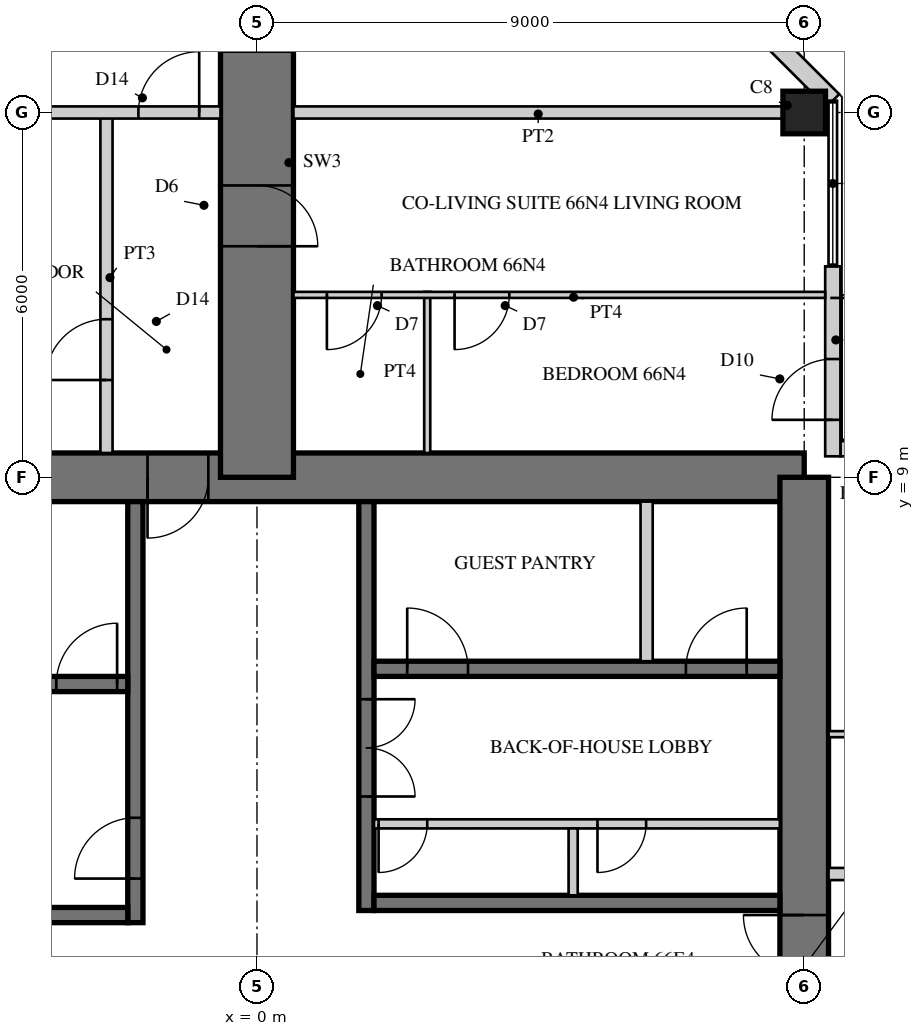
"""IFC4 building model, lengths in metres.
Left out: names, types, materials, properties, quantities, classifications, styles, units other than length and angle.
Written with IfcOpenShell. Run it as: python <this file> out.ifc"""

import sys

from ifc_helpers import new_model, si_unit, direction, frame, frame_2d, origin, origin_2d, place, context, subcontext, project, spatial, rectangle, hollow_rectangle, extrude, element, fill, save


model = new_model("IFC4")
c1 = context("Model", 3, precision=1e-05, world=origin(), true_north=direction((0.0, 1.0)))
c2 = subcontext(c1, "Body", "Model", "MODEL_VIEW")
j1 = project(units=[si_unit("LENGTHUNIT", "METRE"), si_unit("PLANEANGLEUNIT", "RADIAN")], contexts=[c1])
p1 = place(None, origin())
s1 = spatial("IfcSite", under=j1, at=p1, CompositionType="ELEMENT")
p2 = place(p1, origin())
s2 = spatial("IfcBuilding", under=s1, at=p2, CompositionType="ELEMENT")
p3 = place(p2, frame((0.0, 0.0, 257.7)))
s3 = spatial("IfcBuildingStorey", under=s2, at=p3, CompositionType="ELEMENT", Elevation=257.7)
p4 = place(p3, frame((9.0, 9.0, 0.0), z_axis=(0.0, 0.0, 1.0), x_axis=(-1.0, 0.0, 0.0)))
e1 = element("IfcWall", 1, at=p4, inside=s3, PredefinedType="SHEAR", context=c2, shape_type="SweptSolid", body=[
    extrude(rectangle(XDim=18.0, YDim=0.8, at=frame_2d((9.0, 0.0))), origin(), (0.0, 0.0, 1.0), 3.4),
])
p5 = place(p4, frame((9.8, 0.0, 0.0)))
e2 = element("IfcOpeningElement", 2, at=p5, cuts=e1, PredefinedType="OPENING", context=c2, shape_type="SweptSolid", body=[
    extrude(rectangle(XDim=1.0, YDim=2.4, at=frame_2d((0.5, 1.2))), frame((0.0, 0.41, 0.0), z_axis=(0.0, -1.0, 0.0), x_axis=(1.0, 0.0, 0.0)), (0.0, 0.0, 1.0), 0.82),
])
p6 = place(p3, frame((9.0, -9.0, 0.0), z_axis=(0.0, 0.0, 1.0), x_axis=(0.0, 1.0, 0.0)))
e3 = element("IfcWall", 3, at=p6, inside=s3, PredefinedType="SHEAR", context=c2, shape_type="SweptSolid", body=[
    extrude(rectangle(XDim=18.0, YDim=0.8, at=frame_2d((9.0, 0.0))), origin(), (0.0, 0.0, 1.0), 3.4),
])
p7 = place(p6, frame((9.8, 0.0, 0.0)))
e4 = element("IfcOpeningElement", 4, at=p7, cuts=e3, PredefinedType="OPENING", context=c2, shape_type="SweptSolid", body=[
    extrude(rectangle(XDim=1.0, YDim=2.4, at=frame_2d((0.5, 1.2))), frame((0.0, 0.41, 0.0), z_axis=(0.0, -1.0, 0.0), x_axis=(1.0, 0.0, 0.0)), (0.0, 0.0, 1.0), 0.82),
])
p8 = place(p3, frame((1.8, 1.875, 0.0), z_axis=(0.0, 0.0, 1.0), x_axis=(0.0, 1.0, 0.0)))
e5 = element("IfcWall", 5, at=p8, inside=s3, PredefinedType="SHEAR", context=c2, shape_type="SweptSolid", body=[
    extrude(rectangle(XDim=6.725, YDim=0.25, at=frame_2d((3.363, 0.0))), origin(), (0.0, 0.0, 1.0), 3.4),
])
p9 = place(p8, frame((1.875, 0.0, 0.0)))
e6 = element("IfcOpeningElement", 6, at=p9, cuts=e5, PredefinedType="OPENING", context=c2, shape_type="SweptSolid", body=[
    extrude(rectangle(XDim=1.6, YDim=2.4, at=frame_2d((0.8, 1.2))), frame((0.0, 0.135, 0.0), z_axis=(0.0, -1.0, 0.0), x_axis=(1.0, 0.0, 0.0)), (0.0, 0.0, 1.0), 0.27),
])
p10 = place(p3, frame((1.925, 2.0, 0.0), z_axis=(0.0, 0.0, 1.0), x_axis=(1.0, 0.0, 0.0)))
e7 = element("IfcWall", 7, at=p10, inside=s3, PredefinedType="SHEAR", context=c2, shape_type="SweptSolid", body=[
    extrude(rectangle(XDim=6.675, YDim=0.25, at=frame_2d((3.337, 0.0))), origin(), (0.0, 0.0, 1.0), 3.4),
])
p11 = place(p3, frame((1.925, 5.85, 0.0), z_axis=(0.0, 0.0, 1.0), x_axis=(1.0, 0.0, 0.0)))
e8 = element("IfcWall", 8, at=p11, inside=s3, PredefinedType="SHEAR", context=c2, shape_type="SweptSolid", body=[
    extrude(rectangle(XDim=6.675, YDim=0.25, at=frame_2d((3.337, 0.0))), origin(), (0.0, 0.0, 1.0), 3.4),
])
p12 = place(p11, frame((0.546, 0.0, 0.0)))
e9 = element("IfcOpeningElement", 9, at=p12, cuts=e8, PredefinedType="OPENING", context=c2, shape_type="SweptSolid", body=[
    extrude(rectangle(XDim=1.0, YDim=2.1, at=frame_2d((0.5, 1.05))), frame((0.0, 0.135, 0.0), z_axis=(0.0, -1.0, 0.0), x_axis=(1.0, 0.0, 0.0)), (0.0, 0.0, 1.0), 0.27),
])
p13 = place(p11, frame((5.129, 0.0, 0.0)))
e10 = element("IfcOpeningElement", 10, at=p13, cuts=e8, PredefinedType="OPENING", context=c2, shape_type="SweptSolid", body=[
    extrude(rectangle(XDim=1.0, YDim=2.1, at=frame_2d((0.5, 1.05))), frame((0.0, 0.135, 0.0), z_axis=(0.0, -1.0, 0.0), x_axis=(1.0, 0.0, 0.0)), (0.0, 0.0, 1.0), 0.27),
])
p14 = place(p3, frame((1.925, 3.3, 0.0), z_axis=(0.0, 0.0, 1.0), x_axis=(1.0, 0.0, 0.0)))
e11 = element("IfcWall", 11, at=p14, inside=s3, PredefinedType="PARTITIONING", context=c2, shape_type="SweptSolid", body=[
    extrude(rectangle(XDim=6.675, YDim=0.15, at=frame_2d((3.337, 0.0))), origin(), (0.0, 0.0, 1.0), 3.4),
])
p15 = place(p14, frame((0.075, 0.0, 0.0)))
e12 = element("IfcOpeningElement", 12, at=p15, cuts=e11, PredefinedType="OPENING", context=c2, shape_type="SweptSolid", body=[
    extrude(rectangle(XDim=0.8, YDim=2.1, at=frame_2d((0.4, 1.05))), frame((0.0, 0.085, 0.0), z_axis=(0.0, -1.0, 0.0), x_axis=(1.0, 0.0, 0.0)), (0.0, 0.0, 1.0), 0.17),
])
p16 = place(p14, frame((3.675, 0.0, 0.0)))
e13 = element("IfcOpeningElement", 13, at=p16, cuts=e11, PredefinedType="OPENING", context=c2, shape_type="SweptSolid", body=[
    extrude(rectangle(XDim=0.8, YDim=2.1, at=frame_2d((0.4, 1.05))), frame((0.0, 0.085, 0.0), z_axis=(0.0, -1.0, 0.0), x_axis=(1.0, 0.0, 0.0)), (0.0, 0.0, 1.0), 0.17),
])
p17 = place(p3, frame((5.2, 2.125, 0.0), z_axis=(0.0, 0.0, 1.0), x_axis=(0.0, 1.0, 0.0)))
e14 = element("IfcWall", 14, at=p17, inside=s3, PredefinedType="PARTITIONING", context=c2, shape_type="SweptSolid", body=[
    extrude(rectangle(XDim=1.1, YDim=0.15, at=frame_2d((0.55, 0.0))), origin(), (0.0, 0.0, 1.0), 3.4),
])
p18 = place(p3, frame((6.408, 5.975, 0.0), z_axis=(0.0, 0.0, 1.0), x_axis=(0.0, 1.0, 0.0)))
e15 = element("IfcWall", 15, at=p18, inside=s3, PredefinedType="PARTITIONING", context=c2, shape_type="SweptSolid", body=[
    extrude(rectangle(XDim=2.625, YDim=0.2, at=frame_2d((1.312, 0.0))), origin(), (0.0, 0.0, 1.0), 3.4),
])
p19 = place(p3, frame((-2.0, 1.675, 0.0), z_axis=(0.0, 0.0, 1.0), x_axis=(0.0, 1.0, 0.0)))
e16 = element("IfcWall", 16, at=p19, inside=s3, PredefinedType="SHEAR", context=c2, shape_type="SweptSolid", body=[
    extrude(rectangle(XDim=6.925, YDim=0.25, at=frame_2d((3.462, 0.0))), origin(), (0.0, 0.0, 1.0), 3.4),
])
p20 = place(p19, frame((0.725, 0.0, 0.0)))
e17 = element("IfcOpeningElement", 17, at=p20, cuts=e16, PredefinedType="OPENING", context=c2, shape_type="SweptSolid", body=[
    extrude(rectangle(XDim=1.0, YDim=2.1, at=frame_2d((0.5, 1.05))), frame((0.0, 0.135, 0.0), z_axis=(0.0, -1.0, 0.0), x_axis=(1.0, 0.0, 0.0)), (0.0, 0.0, 1.0), 0.27),
])
p21 = place(p3, frame((-2.125, 1.8, 0.0), z_axis=(0.0, 0.0, 1.0), x_axis=(-1.0, 0.0, 0.0)))
e18 = element("IfcWall", 18, at=p21, inside=s3, PredefinedType="SHEAR", context=c2, shape_type="SweptSolid", body=[
    extrude(rectangle(XDim=6.475, YDim=0.25, at=frame_2d((3.238, 0.0))), origin(), (0.0, 0.0, 1.0), 3.4),
])
p22 = place(p3, frame((-2.125, 5.6, 0.0), z_axis=(0.0, 0.0, 1.0), x_axis=(-1.0, 0.0, 0.0)))
e19 = element("IfcWall", 19, at=p22, inside=s3, PredefinedType="SHEAR", context=c2, shape_type="SweptSolid", body=[
    extrude(rectangle(XDim=6.475, YDim=0.25, at=frame_2d((3.238, 0.0))), origin(), (0.0, 0.0, 1.0), 3.4),
])
p23 = place(p22, frame((0.175, 0.0, 0.0)))
e20 = element("IfcOpeningElement", 20, at=p23, cuts=e19, PredefinedType="OPENING", context=c2, shape_type="SweptSolid", body=[
    extrude(rectangle(XDim=1.0, YDim=2.1, at=frame_2d((0.5, 1.05))), frame((0.0, 0.135, 0.0), z_axis=(0.0, -1.0, 0.0), x_axis=(1.0, 0.0, 0.0)), (0.0, 0.0, 1.0), 0.27),
])
p24 = place(p3, frame((0.0, 9.0, 0.0), z_axis=(0.0, 0.0, 1.0), x_axis=(0.0, 1.0, 0.0)))
e21 = element("IfcWall", 21, at=p24, inside=s3, PredefinedType="SHEAR", context=c2, shape_type="SweptSolid", body=[
    extrude(rectangle(XDim=9.0, YDim=1.2, at=frame_2d((4.5, 0.0))), origin(), (0.0, 0.0, 1.0), 3.4),
])
p25 = place(p24, frame((3.8, 0.0, 0.0)))
e22 = element("IfcOpeningElement", 22, at=p25, cuts=e21, PredefinedType="OPENING", context=c2, shape_type="SweptSolid", body=[
    extrude(rectangle(XDim=1.0, YDim=2.15, at=frame_2d((0.5, 1.075))), frame((0.0, 0.61, 0.0), z_axis=(0.0, -1.0, 0.0), x_axis=(1.0, 0.0, 0.0)), (0.0, 0.0, 1.0), 1.22),
])
p26 = place(p24, frame((7.0, 0.0, 0.0)))
e23 = element("IfcOpeningElement", 23, at=p26, cuts=e21, PredefinedType="OPENING", context=c2, shape_type="SweptSolid", body=[
    extrude(rectangle(XDim=1.0, YDim=2.2, at=frame_2d((0.5, 1.1))), frame((0.0, 0.61, 0.0), z_axis=(0.0, -1.0, 0.0), x_axis=(1.0, 0.0, 0.0)), (0.0, 0.0, 1.0), 1.22),
])
p27 = place(p3, frame((9.0, 15.0, 0.0), z_axis=(0.0, 0.0, 1.0), x_axis=(1.0, 0.0, 0.0)))
e24 = element("IfcColumn", 24, at=p27, inside=s3, PredefinedType="COLUMN", context=c2, shape_type="SweptSolid", body=[
    extrude(rectangle(XDim=0.7, YDim=0.7, at=origin_2d()), origin(), (0.0, 0.0, 1.0), 3.4),
])
p28 = place(p3, frame((12.47, 9.47, 0.0), z_axis=(0.0, 0.0, 1.0), x_axis=(-1.0, 0.0, 0.0)))
e25 = element("IfcWall", 25, at=p28, inside=s3, PredefinedType="SOLIDWALL", context=c2, shape_type="SweptSolid", body=[
    extrude(rectangle(XDim=2.875, YDim=0.25, at=frame_2d((1.438, 0.0))), origin(), (0.0, 0.0, 1.0), 3.22),
])
p29 = place(p28, frame((0.6, 0.0, 0.0)))
e26 = element("IfcOpeningElement", 26, at=p29, cuts=e25, PredefinedType="OPENING", context=c2, shape_type="SweptSolid", body=[
    extrude(rectangle(XDim=1.0, YDim=2.2, at=frame_2d((0.5, 1.1))), frame((0.0, 0.135, 0.0), z_axis=(0.0, -1.0, 0.0), x_axis=(1.0, 0.0, 0.0)), (0.0, 0.0, 1.0), 0.27),
])
p30 = place(p3, frame((9.47, 9.345, 0.0), z_axis=(0.0, 0.0, 1.0), x_axis=(0.0, 1.0, 0.0)))
e27 = element("IfcWall", 27, at=p30, inside=s3, PredefinedType="SOLIDWALL", context=c2, shape_type="SweptSolid", body=[
    extrude(rectangle(XDim=3.125, YDim=0.25, at=frame_2d((1.562, 0.0))), origin(), (0.0, 0.0, 1.0), 3.22),
])
p31 = place(p30, frame((0.6, 0.0, 0.0)))
e28 = element("IfcOpeningElement", 28, at=p31, cuts=e27, PredefinedType="OPENING", context=c2, shape_type="SweptSolid", body=[
    extrude(rectangle(XDim=1.0, YDim=2.2, at=frame_2d((0.5, 1.1))), frame((0.0, 0.135, 0.0), z_axis=(0.0, -1.0, 0.0), x_axis=(1.0, 0.0, 0.0)), (0.0, 0.0, 1.0), 0.27),
])
p32 = place(p3, frame((9.47, 15.195, 0.0), z_axis=(0.0, 0.0, 1.0), x_axis=(-0.707081433678, 0.707132127787, 0.0)))
e29 = element("IfcWall", 29, at=p32, inside=s3, PredefinedType="SOLIDWALL", context=c2, shape_type="SweptSolid", body=[
    extrude(rectangle(XDim=4.816, YDim=0.3, at=frame_2d((2.408, 0.0))), origin(), (0.0, 0.0, 1.0), 3.22),
])
p33 = place(p32, frame((1.958, 0.0, 0.3)))
e30 = element("IfcOpeningElement", 30, at=p33, cuts=e29, PredefinedType="OPENING", context=c2, shape_type="SweptSolid", body=[
    extrude(rectangle(XDim=0.9, YDim=2.4, at=frame_2d((0.45, 1.2))), frame((0.0, 0.16, 0.0), z_axis=(0.0, -1.0, 0.0), x_axis=(1.0, 0.0, 0.0)), (0.0, 0.0, 1.0), 0.32),
])
p34 = place(p3, frame((2.8, 9.4, 0.0), z_axis=(0.0, 0.0, 1.0), x_axis=(0.0, 1.0, 0.0)))
e31 = element("IfcWall", 31, at=p34, inside=s3, PredefinedType="PARTITIONING", context=c2, shape_type="SweptSolid", body=[
    extrude(rectangle(XDim=2.65, YDim=0.1, at=frame_2d((1.325, 0.0))), origin(), (0.0, 0.0, 1.0), 3.22),
])
p35 = place(p3, frame((9.345, 12.0, 0.0), z_axis=(0.0, 0.0, 1.0), x_axis=(-1.0, 0.0, 0.0)))
e32 = element("IfcWall", 32, at=p35, inside=s3, PredefinedType="PARTITIONING", context=c2, shape_type="SweptSolid", body=[
    extrude(rectangle(XDim=8.745, YDim=0.1, at=frame_2d((4.373, 0.0))), origin(), (0.0, 0.0, 1.0), 3.22),
])
p36 = place(p35, frame((5.195, 0.0, 0.0)))
e33 = element("IfcOpeningElement", 33, at=p36, cuts=e32, PredefinedType="OPENING", context=c2, shape_type="SweptSolid", body=[
    extrude(rectangle(XDim=0.9, YDim=2.1, at=frame_2d((0.45, 1.05))), frame((0.0, 0.06, 0.0), z_axis=(0.0, -1.0, 0.0), x_axis=(1.0, 0.0, 0.0)), (0.0, 0.0, 1.0), 0.12),
])
p37 = place(p35, frame((7.295, 0.0, 0.0)))
e34 = element("IfcOpeningElement", 34, at=p37, cuts=e32, PredefinedType="OPENING", context=c2, shape_type="SweptSolid", body=[
    extrude(rectangle(XDim=0.9, YDim=2.1, at=frame_2d((0.45, 1.05))), frame((0.0, 0.06, 0.0), z_axis=(0.0, -1.0, 0.0), x_axis=(1.0, 0.0, 0.0)), (0.0, 0.0, 1.0), 0.12),
])
p38 = place(p3, frame((-2.475, 9.4, 0.0), z_axis=(0.0, 0.0, 1.0), x_axis=(0.0, 1.0, 0.0)))
e35 = element("IfcWall", 35, at=p38, inside=s3, PredefinedType="SOLIDWALL", context=c2, shape_type="SweptSolid", body=[
    extrude(rectangle(XDim=5.6, YDim=0.2, at=frame_2d((2.8, 0.0))), origin(), (0.0, 0.0, 1.0), 3.22),
])
p39 = place(p38, frame((1.2, 0.0, 0.0)))
e36 = element("IfcOpeningElement", 36, at=p39, cuts=e35, PredefinedType="OPENING", context=c2, shape_type="SweptSolid", body=[
    extrude(rectangle(XDim=1.0, YDim=2.2, at=frame_2d((0.5, 1.1))), frame((0.0, 0.11, 0.0), z_axis=(0.0, -1.0, 0.0), x_axis=(1.0, 0.0, 0.0)), (0.0, 0.0, 1.0), 0.22),
])
p40 = place(p3, frame((8.65, 15.0, 0.0), z_axis=(0.0, 0.0, 1.0), x_axis=(-1.0, 0.0, 0.0)))
e37 = element("IfcWall", 37, at=p40, inside=s3, PredefinedType="SOLIDWALL", context=c2, shape_type="SweptSolid", body=[
    extrude(rectangle(XDim=8.05, YDim=0.2, at=frame_2d((4.025, 0.0))), origin(), (0.0, 0.0, 1.0), 2.52),
])
p41 = place(p3, frame((-0.6, 15.0, 0.0), z_axis=(0.0, 0.0, 1.0), x_axis=(-1.0, 0.0, 0.0)))
e38 = element("IfcWall", 38, at=p41, inside=s3, PredefinedType="SOLIDWALL", context=c2, shape_type="SweptSolid", body=[
    extrude(rectangle(XDim=8.05, YDim=0.2, at=frame_2d((4.025, 0.0))), origin(), (0.0, 0.0, 1.0), 2.52),
])
p42 = place(p41, frame((0.35, 0.0, 0.0)))
e39 = element("IfcOpeningElement", 39, at=p42, cuts=e38, PredefinedType="OPENING", context=c2, shape_type="SweptSolid", body=[
    extrude(rectangle(XDim=1.0, YDim=2.2, at=frame_2d((0.5, 1.1))), frame((0.0, 0.11, 0.0), z_axis=(0.0, -1.0, 0.0), x_axis=(1.0, 0.0, 0.0)), (0.0, 0.0, 1.0), 0.22),
])
p43 = place(p3, frame((9.4, 4.775, 0.0), z_axis=(0.0, 0.0, 1.0), x_axis=(1.0, 0.0, 0.0)))
e40 = element("IfcWall", 40, at=p43, inside=s3, PredefinedType="PARTITIONING", context=c2, shape_type="SweptSolid", body=[
    extrude(rectangle(XDim=3.25, YDim=0.1, at=frame_2d((1.625, 0.0))), origin(), (0.0, 0.0, 1.0), 3.22),
])
p44 = place(p3, frame((9.4, 2.475, 0.0), z_axis=(0.0, 0.0, 1.0), x_axis=(1.0, 0.0, 0.0)))
e41 = element("IfcWall", 41, at=p44, inside=s3, PredefinedType="SOLIDWALL", context=c2, shape_type="SweptSolid", body=[
    extrude(rectangle(XDim=5.6, YDim=0.2, at=frame_2d((2.8, 0.0))), origin(), (0.0, 0.0, 1.0), 3.22),
])
p45 = place(p44, frame((3.75, 0.0, 0.0)))
e42 = element("IfcOpeningElement", 42, at=p45, cuts=e41, PredefinedType="OPENING", context=c2, shape_type="SweptSolid", body=[
    extrude(rectangle(XDim=1.0, YDim=2.15, at=frame_2d((0.5, 1.075))), frame((0.0, 0.11, 0.0), z_axis=(0.0, -1.0, 0.0), x_axis=(1.0, 0.0, 0.0)), (0.0, 0.0, 1.0), 0.22),
])
p46 = place(p31, origin())
e43 = element("IfcDoor", 43, at=p46, inside=s3, OperationType="SINGLE_SWING_LEFT", PredefinedType="DOOR", context=c2, shape_type="SweptSolid", body=[
    extrude(hollow_rectangle(XDim=1.0, YDim=2.2, WallThickness=0.06, at=frame_2d((0.5, 1.1))), frame((0.0, 0.025, 0.0), z_axis=(0.0, -1.0, 0.0), x_axis=(1.0, 0.0, 0.0)), (0.0, 0.0, 1.0), 0.05),
    extrude(rectangle(XDim=0.879, YDim=2.079, at=frame_2d((0.5, 1.1))), frame((0.0, 0.025, 0.0), z_axis=(0.0, -1.0, 0.0), x_axis=(1.0, 0.0, 0.0)), (0.0, 0.0, 1.0), 0.05),
])
fill(e28, e43)
p47 = place(p36, origin())
e44 = element("IfcDoor", 44, at=p47, inside=s3, OperationType="SINGLE_SWING_RIGHT", PredefinedType="DOOR", context=c2, shape_type="SweptSolid", body=[
    extrude(rectangle(XDim=0.9, YDim=2.1, at=frame_2d((0.45, 1.05))), frame((0.0, 0.025, 0.0), z_axis=(0.0, -1.0, 0.0), x_axis=(1.0, 0.0, 0.0)), (0.0, 0.0, 1.0), 0.05),
])
fill(e33, e44)
p48 = place(p37, origin())
e45 = element("IfcDoor", 45, at=p48, inside=s3, OperationType="SINGLE_SWING_RIGHT", PredefinedType="DOOR", context=c2, shape_type="SweptSolid", body=[
    extrude(rectangle(XDim=0.9, YDim=2.1, at=frame_2d((0.45, 1.05))), frame((0.0, 0.025, 0.0), z_axis=(0.0, -1.0, 0.0), x_axis=(1.0, 0.0, 0.0)), (0.0, 0.0, 1.0), 0.05),
])
fill(e34, e45)
p49 = place(p39, origin())
e46 = element("IfcDoor", 46, at=p49, inside=s3, OperationType="SINGLE_SWING_LEFT", PredefinedType="DOOR", context=c2, shape_type="SweptSolid", body=[
    extrude(rectangle(XDim=1.0, YDim=2.2, at=frame_2d((0.5, 1.1))), frame((0.0, 0.025, 0.0), z_axis=(0.0, -1.0, 0.0), x_axis=(1.0, 0.0, 0.0)), (0.0, 0.0, 1.0), 0.05),
])
fill(e36, e46)
p50 = place(p42, frame((1.0, 0.0, 0.0), z_axis=(0.0, 0.0, 1.0), x_axis=(-1.0, 0.0, 0.0)))
e47 = element("IfcDoor", 47, at=p50, inside=s3, OperationType="SINGLE_SWING_RIGHT", PredefinedType="DOOR", context=c2, shape_type="SweptSolid", body=[
    extrude(rectangle(XDim=1.0, YDim=2.2, at=frame_2d((0.5, 1.1))), frame((0.0, 0.025, 0.0), z_axis=(0.0, -1.0, 0.0), x_axis=(1.0, 0.0, 0.0)), (0.0, 0.0, 1.0), 0.05),
])
fill(e39, e47)
p51 = place(p25, frame((1.0, 0.0, 0.0), z_axis=(0.0, 0.0, 1.0), x_axis=(-1.0, 0.0, 0.0)))
e48 = element("IfcDoor", 48, at=p51, inside=s3, OperationType="SINGLE_SWING_RIGHT", PredefinedType="DOOR", context=c2, shape_type="SweptSolid", body=[
    extrude(rectangle(XDim=1.0, YDim=2.15, at=frame_2d((0.5, 1.075))), frame((0.0, 0.025, 0.0), z_axis=(0.0, -1.0, 0.0), x_axis=(1.0, 0.0, 0.0)), (0.0, 0.0, 1.0), 0.05),
])
fill(e22, e48)
p52 = place(p5, origin())
e49 = element("IfcDoor", 49, at=p52, inside=s3, OperationType="SINGLE_SWING_RIGHT", PredefinedType="DOOR", context=c2, shape_type="SweptSolid", body=[
    extrude(rectangle(XDim=1.0, YDim=2.4, at=frame_2d((0.5, 1.2))), frame((0.0, 0.055, 0.0), z_axis=(0.0, -1.0, 0.0), x_axis=(1.0, 0.0, 0.0)), (0.0, 0.0, 1.0), 0.05),
])
fill(e2, e49)
p53 = place(p7, origin())
e50 = element("IfcDoor", 50, at=p53, inside=s3, OperationType="SINGLE_SWING_RIGHT", PredefinedType="DOOR", context=c2, shape_type="SweptSolid", body=[
    extrude(rectangle(XDim=1.0, YDim=2.4, at=frame_2d((0.5, 1.2))), frame((0.0, 0.055, 0.0), z_axis=(0.0, -1.0, 0.0), x_axis=(1.0, 0.0, 0.0)), (0.0, 0.0, 1.0), 0.05),
])
fill(e4, e50)
p54 = place(p9, frame((1.6, 0.0, 0.0), z_axis=(0.0, 0.0, 1.0), x_axis=(-1.0, 0.0, 0.0)))
e51 = element("IfcDoor", 51, at=p54, inside=s3, OperationType="DOUBLE_DOOR_SINGLE_SWING", PredefinedType="DOOR", context=c2, shape_type="SweptSolid", body=[
    extrude(rectangle(XDim=1.6, YDim=2.4, at=frame_2d((0.8, 1.2))), frame((0.0, 0.025, 0.0), z_axis=(0.0, -1.0, 0.0), x_axis=(1.0, 0.0, 0.0)), (0.0, 0.0, 1.0), 0.05),
])
fill(e6, e51)
p55 = place(p15, frame((0.8, 0.0, 0.0), z_axis=(0.0, 0.0, 1.0), x_axis=(-1.0, 0.0, 0.0)))
e52 = element("IfcDoor", 52, at=p55, inside=s3, OperationType="SINGLE_SWING_RIGHT", PredefinedType="DOOR", context=c2, shape_type="SweptSolid", body=[
    extrude(rectangle(XDim=0.8, YDim=2.1, at=frame_2d((0.4, 1.05))), frame((0.0, 0.025, 0.0), z_axis=(0.0, -1.0, 0.0), x_axis=(1.0, 0.0, 0.0)), (0.0, 0.0, 1.0), 0.05),
])
fill(e12, e52)
p56 = place(p16, frame((0.8, 0.0, 0.0), z_axis=(0.0, 0.0, 1.0), x_axis=(-1.0, 0.0, 0.0)))
e53 = element("IfcDoor", 53, at=p56, inside=s3, OperationType="SINGLE_SWING_RIGHT", PredefinedType="DOOR", context=c2, shape_type="SweptSolid", body=[
    extrude(rectangle(XDim=0.8, YDim=2.1, at=frame_2d((0.4, 1.05))), frame((0.0, 0.025, 0.0), z_axis=(0.0, -1.0, 0.0), x_axis=(1.0, 0.0, 0.0)), (0.0, 0.0, 1.0), 0.05),
])
fill(e13, e53)
p57 = place(p20, origin())
e54 = element("IfcDoor", 54, at=p57, inside=s3, OperationType="SINGLE_SWING_LEFT", PredefinedType="DOOR", context=c2, shape_type="SweptSolid", body=[
    extrude(rectangle(XDim=1.0, YDim=2.1, at=frame_2d((0.5, 1.05))), frame((0.0, 0.025, 0.0), z_axis=(0.0, -1.0, 0.0), x_axis=(1.0, 0.0, 0.0)), (0.0, 0.0, 1.0), 0.05),
])
fill(e17, e54)
p58 = place(p23, frame((1.0, 0.0, 0.0), z_axis=(0.0, 0.0, 1.0), x_axis=(-1.0, 0.0, 0.0)))
e55 = element("IfcDoor", 55, at=p58, inside=s3, OperationType="SINGLE_SWING_RIGHT", PredefinedType="DOOR", context=c2, shape_type="SweptSolid", body=[
    extrude(rectangle(XDim=1.0, YDim=2.1, at=frame_2d((0.5, 1.05))), frame((0.0, 0.025, 0.0), z_axis=(0.0, -1.0, 0.0), x_axis=(1.0, 0.0, 0.0)), (0.0, 0.0, 1.0), 0.05),
])
fill(e20, e55)
p59 = place(p12, origin())
e56 = element("IfcDoor", 56, at=p59, inside=s3, OperationType="SINGLE_SWING_LEFT", PredefinedType="DOOR", context=c2, shape_type="SweptSolid", body=[
    extrude(rectangle(XDim=1.0, YDim=2.1, at=frame_2d((0.5, 1.05))), frame((0.0, 0.025, 0.0), z_axis=(0.0, -1.0, 0.0), x_axis=(1.0, 0.0, 0.0)), (0.0, 0.0, 1.0), 0.05),
])
fill(e9, e56)
p60 = place(p13, origin())
e57 = element("IfcDoor", 57, at=p60, inside=s3, OperationType="SINGLE_SWING_RIGHT", PredefinedType="DOOR", context=c2, shape_type="SweptSolid", body=[
    extrude(rectangle(XDim=1.0, YDim=2.1, at=frame_2d((0.5, 1.05))), frame((0.0, 0.025, 0.0), z_axis=(0.0, -1.0, 0.0), x_axis=(1.0, 0.0, 0.0)), (0.0, 0.0, 1.0), 0.05),
])
fill(e10, e57)
save(model, sys.argv[1])
